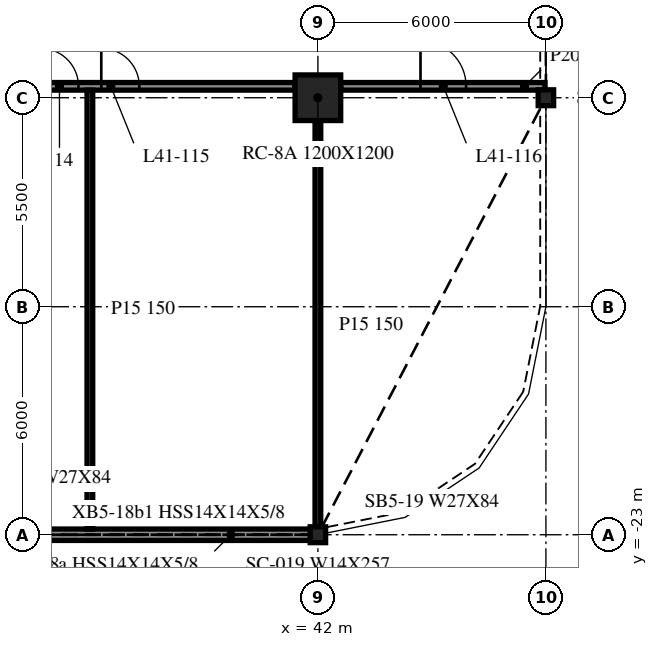
"""IFC4 building model, lengths in metres.
Left out: names, types, materials, properties, quantities, classifications, styles, units other than length and angle.
Written with IfcOpenShell. Run it as: python <this file> out.ifc"""

import sys

from ifc_helpers import new_model, si_unit, direction, frame, frame_2d, origin, origin_2d, place, context, subcontext, project, spatial, rectangle, i_section, extrude, element, fill, save


model = new_model("IFC4")
c1 = context("Model", 3, precision=1e-05, world=origin(), true_north=direction((0.0, 1.0)))
c2 = subcontext(c1, "Body", "Model", "MODEL_VIEW")
j1 = project(units=[si_unit("LENGTHUNIT", "METRE"), si_unit("PLANEANGLEUNIT", "RADIAN")], contexts=[c1])
p1 = place(None, origin())
s1 = spatial("IfcSite", under=j1, at=p1, CompositionType="ELEMENT")
p2 = place(p1, origin())
s2 = spatial("IfcBuilding", under=s1, at=p2, CompositionType="ELEMENT")
p3 = place(p2, frame((0.0, 0.0, 174.4)))
s3 = spatial("IfcBuildingStorey", under=s2, at=p3, CompositionType="ELEMENT", Elevation=174.4)
p4 = place(p3, frame((42.0, -11.5, -0.34), z_axis=(0.0, 0.0, 1.0), x_axis=(1.0, 0.0, 0.0)))
e1 = element("IfcColumn", 1, at=p4, inside=s3, PredefinedType="COLUMN", context=c2, shape_type="SweptSolid", body=[
    extrude(rectangle(XDim=1.2, YDim=1.2, at=origin_2d()), origin(), (0.0, 0.0, 1.0), 3.8),
])
for number, where, z_axis, x_axis in (
    (2, (42.0, -23.0, -0.34), (0.0, 0.0, 1.0), (1.0, 0.0, 0.0)),
    (3, (48.0, -11.5, -0.34), (0.0, 0.0, 1.0), (1.0, 0.0, 0.0)),
):
    element("IfcColumn", number, at=place(p3, frame(where, z_axis=z_axis, x_axis=x_axis)), inside=s3, PredefinedType="COLUMN", context=c2, shape_type="SweptSolid", body=[
        extrude(i_section(OverallWidth=0.406, OverallDepth=0.417, WebThickness=0.03, FlangeThickness=0.048, at=origin_2d()), origin(), (0.0, 0.0, 1.0), 3.8),
    ])
p5 = place(p3, frame((30.015, -23.0, 0.0), z_axis=(0.0, 0.0, 1.0), x_axis=(1.0, 0.0, 0.0)))
e4 = element("IfcWall", 4, at=p5, inside=s3, PredefinedType="NOTDEFINED", context=c2, shape_type="SweptSolid", body=[
    extrude(rectangle(XDim=11.97, YDim=0.3, at=frame_2d((5.985, 0.0))), origin(), (0.0, 0.0, 1.0), 2.782),
])
p6 = place(p3, frame((30.6, -11.2, 0.0), z_axis=(0.0, 0.0, 1.0), x_axis=(1.0, 0.0, 0.0)))
e5 = element("IfcWall", 5, at=p6, inside=s3, PredefinedType="PARTITIONING", context=c2, shape_type="SweptSolid", body=[
    extrude(rectangle(XDim=10.8, YDim=0.2, at=frame_2d((5.4, 0.0))), origin(), (0.0, 0.0, 1.0), 3.46),
])
p7 = place(p6, frame((4.1, 0.0, 0.0)))
e6 = element("IfcOpeningElement", 6, at=p7, cuts=e5, PredefinedType="OPENING", context=c2, shape_type="SweptSolid", body=[
    extrude(rectangle(XDim=1.0, YDim=2.1, at=frame_2d((0.5, 1.05))), frame((0.0, 0.11, 0.0), z_axis=(0.0, -1.0, 0.0), x_axis=(1.0, 0.0, 0.0)), (0.0, 0.0, 1.0), 0.22),
])
p8 = place(p6, frame((5.7, 0.0, 0.0)))
e7 = element("IfcOpeningElement", 7, at=p8, cuts=e5, PredefinedType="OPENING", context=c2, shape_type="SweptSolid", body=[
    extrude(rectangle(XDim=1.0, YDim=2.1, at=frame_2d((0.5, 1.05))), frame((0.0, 0.11, 0.0), z_axis=(0.0, -1.0, 0.0), x_axis=(1.0, 0.0, 0.0)), (0.0, 0.0, 1.0), 0.22),
])
p9 = place(p3, frame((42.6, -11.2, 0.0), z_axis=(0.0, 0.0, 1.0), x_axis=(1.0, 0.0, 0.0)))
e8 = element("IfcWall", 8, at=p9, inside=s3, PredefinedType="PARTITIONING", context=c2, shape_type="SweptSolid", body=[
    extrude(rectangle(XDim=5.375, YDim=0.2, at=frame_2d((2.688, 0.0))), origin(), (0.0, 0.0, 1.0), 3.46),
])
p10 = place(p9, frame((2.1, 0.0, 0.0)))
e9 = element("IfcOpeningElement", 9, at=p10, cuts=e8, PredefinedType="OPENING", context=c2, shape_type="SweptSolid", body=[
    extrude(rectangle(XDim=1.2, YDim=2.1, at=frame_2d((0.6, 1.05))), frame((0.0, 0.11, 0.0), z_axis=(0.0, -1.0, 0.0), x_axis=(1.0, 0.0, 0.0)), (0.0, 0.0, 1.0), 0.22),
])
p11 = place(p3, frame((36.0, -22.85, 0.0), z_axis=(0.0, 0.0, 1.0), x_axis=(0.0, 1.0, 0.0)))
e10 = element("IfcWall", 10, at=p11, inside=s3, PredefinedType="PARTITIONING", context=c2, shape_type="SweptSolid", body=[
    extrude(rectangle(XDim=11.55, YDim=0.15, at=frame_2d((5.775, 0.0))), origin(), (0.0, 0.0, 1.0), 3.46),
])
p12 = place(p3, frame((42.0, -22.847, 0.0), z_axis=(0.0, 0.0, 1.0), x_axis=(0.0, 1.0, 0.0)))
e11 = element("IfcWall", 11, at=p12, inside=s3, PredefinedType="PARTITIONING", context=c2, shape_type="SweptSolid", body=[
    extrude(rectangle(XDim=10.747, YDim=0.15, at=frame_2d((5.374, 0.0))), origin(), (0.0, 0.0, 1.0), 3.46),
])
p13 = place(p7, origin())
e12 = element("IfcDoor", 12, at=p13, inside=s3, OperationType="SINGLE_SWING_RIGHT", PredefinedType="DOOR", context=c2, shape_type="SweptSolid", body=[
    extrude(rectangle(XDim=1.0, YDim=2.1, at=frame_2d((0.5, 1.05))), frame((0.0, 0.025, 0.0), z_axis=(0.0, -1.0, 0.0), x_axis=(1.0, 0.0, 0.0)), (0.0, 0.0, 1.0), 0.05),
])
fill(e6, e12)
p14 = place(p8, origin())
e13 = element("IfcDoor", 13, at=p14, inside=s3, OperationType="SINGLE_SWING_LEFT", PredefinedType="DOOR", context=c2, shape_type="SweptSolid", body=[
    extrude(rectangle(XDim=1.0, YDim=2.1, at=frame_2d((0.5, 1.05))), frame((0.0, 0.025, 0.0), z_axis=(0.0, -1.0, 0.0), x_axis=(1.0, 0.0, 0.0)), (0.0, 0.0, 1.0), 0.05),
])
fill(e7, e13)
p15 = place(p10, origin())
e14 = element("IfcDoor", 14, at=p15, inside=s3, OperationType="SINGLE_SWING_LEFT", PredefinedType="DOOR", context=c2, shape_type="SweptSolid", body=[
    extrude(rectangle(XDim=1.2, YDim=2.1, at=frame_2d((0.6, 1.05))), frame((0.0, 0.025, 0.0), z_axis=(0.0, -1.0, 0.0), x_axis=(1.0, 0.0, 0.0)), (0.0, 0.0, 1.0), 0.05),
])
fill(e9, e14)
save(model, sys.argv[1])
